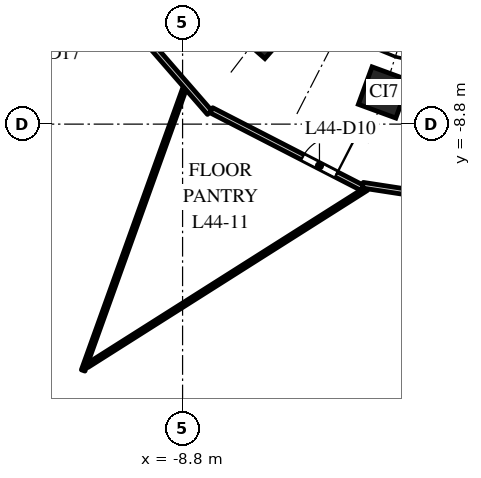
"""IFC4 building model, lengths in metres.
Left out: names, types, materials, properties, quantities, classifications, styles, units other than length and angle.
Written with IfcOpenShell. Run it as: python <this file> out.ifc"""

import sys

from ifc_helpers import new_model, si_unit, direction, frame, frame_2d, origin, origin_2d, place, context, subcontext, project, spatial, rectangle, extrude, element, fill, save


model = new_model("IFC4")
c1 = context("Model", 3, precision=1e-05, world=origin(), true_north=direction((0.0, 1.0)))
c2 = subcontext(c1, "Body", "Model", "MODEL_VIEW")
j1 = project(units=[si_unit("LENGTHUNIT", "METRE"), si_unit("PLANEANGLEUNIT", "RADIAN")], contexts=[c1])
p1 = place(None, origin())
s1 = spatial("IfcSite", under=j1, at=p1, CompositionType="ELEMENT")
p2 = place(p1, origin())
s2 = spatial("IfcBuilding", under=s1, at=p2, CompositionType="ELEMENT")
p3 = place(p2, frame((0.0, 0.0, 190.0)))
s3 = spatial("IfcBuildingStorey", under=s2, at=p3, CompositionType="ELEMENT", Elevation=190.0)
for number, where, z_axis, x_axis in (
    (1, (-6.682, -6.334, 0.0), (0.0, 0.0, 1.0), (0.751, -0.66, 0.0)),
    (2, (-3.501, -7.967, 0.0), (0.0, 0.0, 1.0), (0.939, -0.344, 0.0)),
):
    element("IfcColumn", number, at=place(p3, frame(where, z_axis=z_axis, x_axis=x_axis)), inside=s3, PredefinedType="COLUMN", context=c2, shape_type="SweptSolid", body=[
        extrude(rectangle(XDim=1.05, YDim=1.05, at=origin_2d()), origin(), (0.0, 0.0, 1.0), 4.0),
    ])
p4 = place(p3, frame((-16.5, -7.727, 0.0), z_axis=(0.0, 0.0, 1.0), x_axis=(0.808900994583, 0.587944879188, 0.0)))
e3 = element("IfcWall", 3, at=p4, inside=s3, PredefinedType="PARTITIONING", context=c2, shape_type="SweptSolid", body=[
    extrude(rectangle(XDim=6.273, YDim=0.15, at=frame_2d((3.136, 0.0))), origin(), (0.0, 0.0, 1.0), 3.7),
])
p5 = place(p4, frame((4.542, 0.0, 0.0)))
e4 = element("IfcOpeningElement", 4, at=p5, cuts=e3, PredefinedType="OPENING", context=c2, shape_type="SweptSolid", body=[
    extrude(rectangle(XDim=1.0, YDim=2.1, at=frame_2d((0.5, 1.05))), frame((0.0, 0.085, 0.0), z_axis=(0.0, -1.0, 0.0), x_axis=(1.0, 0.0, 0.0)), (0.0, 0.0, 1.0), 0.17),
])
p6 = place(p3, frame((-15.059, -8.658, 0.0), z_axis=(0.0, 0.0, 1.0), x_axis=(0.808838005268, 0.588031530816, 0.0)))
e5 = element("IfcWall", 5, at=p6, inside=s3, PredefinedType="PARTITIONING", context=c2, shape_type="SweptSolid", body=[
    extrude(rectangle(XDim=5.386, YDim=0.15, at=frame_2d((2.693, 0.0))), origin(), (0.0, 0.0, 1.0), 3.7),
])
p7 = place(p3, frame((-11.416, -15.282, 0.0), z_axis=(0.0, 0.0, 1.0), x_axis=(0.338341338167, 0.941023452889, 0.0)))
e6 = element("IfcWall", 6, at=p7, inside=s3, PredefinedType="PARTITIONING", context=c2, shape_type="SweptSolid", body=[
    extrude(rectangle(XDim=7.888, YDim=0.1, at=frame_2d((3.944, 0.0))), origin(), (0.0, 0.0, 1.0), 2.85),
])
p8 = place(p3, frame((-11.319, -15.161, 0.0), z_axis=(0.0, 0.0, 1.0), x_axis=(0.844832168381, 0.53503140774, 0.0)))
e7 = element("IfcWall", 7, at=p8, inside=s3, PredefinedType="PARTITIONING", context=c2, shape_type="SweptSolid", body=[
    extrude(rectangle(XDim=8.71, YDim=0.1, at=frame_2d((4.355, 0.0))), origin(), (0.0, 0.0, 1.0), 2.85),
])
p9 = place(p3, frame((-10.703, -5.491, 0.0), z_axis=(0.0, 0.0, 1.0), x_axis=(0.656266732873, -0.754528975802, 0.0)))
e8 = element("IfcWall", 8, at=p9, inside=s3, PredefinedType="PARTITIONING", context=c2, shape_type="SweptSolid", body=[
    extrude(rectangle(XDim=3.983, YDim=0.15, at=frame_2d((1.991, 0.0))), origin(), (0.0, 0.0, 1.0), 2.75),
])
p10 = place(p3, frame((-8.042, -8.435, 0.0), z_axis=(0.0, 0.0, 1.0), x_axis=(0.88929925529, -0.457325742268, 0.0)))
e9 = element("IfcWall", 9, at=p10, inside=s3, PredefinedType="PARTITIONING", context=c2, shape_type="SweptSolid", body=[
    extrude(rectangle(XDim=4.459, YDim=0.15, at=frame_2d((2.229, 0.0))), origin(), (0.0, 0.0, 1.0), 2.85),
])
p11 = place(p10, frame((2.698, 0.0, 0.0)))
e10 = element("IfcOpeningElement", 10, at=p11, cuts=e9, PredefinedType="OPENING", context=c2, shape_type="SweptSolid", body=[
    extrude(rectangle(XDim=1.0, YDim=2.1, at=frame_2d((0.5, 1.05))), frame((0.0, 0.085, 0.0), z_axis=(0.0, -1.0, 0.0), x_axis=(1.0, 0.0, 0.0)), (0.0, 0.0, 1.0), 0.17),
])
p12 = place(p3, frame((-4.056, -10.408, 0.0), z_axis=(0.0, 0.0, 1.0), x_axis=(0.988437567576, -0.151628410943, 0.0)))
e11 = element("IfcWall", 11, at=p12, inside=s3, PredefinedType="PARTITIONING", context=c2, shape_type="SweptSolid", body=[
    extrude(rectangle(XDim=2.011, YDim=0.15, at=frame_2d((1.005, 0.0))), origin(), (0.0, 0.0, 1.0), 3.7),
])
p13 = place(p11, origin())
e12 = element("IfcDoor", 12, at=p13, inside=s3, OperationType="SINGLE_SWING_RIGHT", PredefinedType="DOOR", context=c2, shape_type="SweptSolid", body=[
    extrude(rectangle(XDim=1.0, YDim=2.1, at=frame_2d((0.5, 1.05))), frame((0.0, 0.025, 0.0), z_axis=(0.0, -1.0, 0.0), x_axis=(1.0, 0.0, 0.0)), (0.0, 0.0, 1.0), 0.05),
])
fill(e10, e12)
save(model, sys.argv[1])
